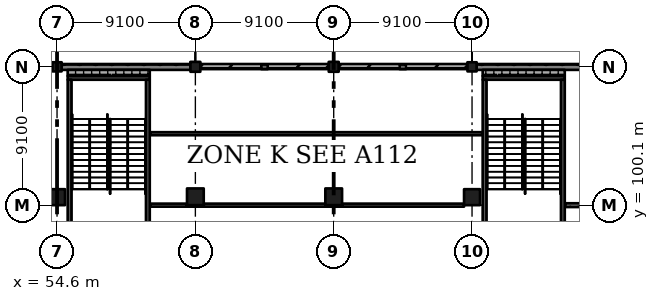
"""IFC4 building model, lengths in metres.
Left out: names, types, materials, properties, quantities, classifications, styles, units other than length and angle.
Written with IfcOpenShell. Run it as: python <this file> out.ifc"""

import sys

from ifc_helpers import new_model, si_unit, direction, frame, frame_2d, origin, origin_2d, place, context, subcontext, project, spatial, rectangle, extrude, element, fill, save


model = new_model("IFC4")
c1 = context("Model", 3, precision=1e-05, world=origin(), true_north=direction((0.0, 1.0)))
c2 = subcontext(c1, "Body", "Model", "MODEL_VIEW")
j1 = project(units=[si_unit("LENGTHUNIT", "METRE"), si_unit("PLANEANGLEUNIT", "RADIAN")], contexts=[c1])
p1 = place(None, origin())
s1 = spatial("IfcSite", under=j1, at=p1, CompositionType="ELEMENT")
p2 = place(p1, origin())
s2 = spatial("IfcBuilding", under=s1, at=p2, CompositionType="ELEMENT")
p3 = place(p2, origin())
s3 = spatial("IfcBuildingStorey", under=s2, at=p3, CompositionType="ELEMENT", Elevation=0.0)
p4 = place(p3, frame((54.6, 100.625, -0.4), z_axis=(0.0, 0.0, 1.0), x_axis=(1.0, 0.0, 0.0)))
e1 = element("IfcColumn", 1, at=p4, inside=s3, PredefinedType="COLUMN", context=c2, shape_type="SweptSolid", body=[
    extrude(rectangle(XDim=1.05, YDim=1.05, at=origin_2d()), origin(), (0.0, 0.0, 1.0), 6.77),
])
p5 = place(p3, frame((54.6, 109.2, -0.4), z_axis=(0.0, 0.0, 1.0), x_axis=(1.0, 0.0, 0.0)))
e2 = element("IfcColumn", 2, at=p5, inside=s3, PredefinedType="COLUMN", context=c2, shape_type="SweptSolid", body=[
    extrude(rectangle(XDim=0.6, YDim=0.6, at=origin_2d()), origin(), (0.0, 0.0, 1.0), 6.77),
])
p6 = place(p3, frame((63.7, 100.65, -0.4), z_axis=(0.0, 0.0, 1.0), x_axis=(1.0, 0.0, 0.0)))
e3 = element("IfcColumn", 3, at=p6, inside=s3, PredefinedType="COLUMN", context=c2, shape_type="SweptSolid", body=[
    extrude(rectangle(XDim=1.1, YDim=1.1, at=origin_2d()), origin(), (0.0, 0.0, 1.0), 6.77),
])
p7 = place(p3, frame((63.7, 109.2, -0.4), z_axis=(0.0, 0.0, 1.0), x_axis=(1.0, 0.0, 0.0)))
e4 = element("IfcColumn", 4, at=p7, inside=s3, PredefinedType="COLUMN", context=c2, shape_type="SweptSolid", body=[
    extrude(rectangle(XDim=0.65, YDim=0.65, at=origin_2d()), origin(), (0.0, 0.0, 1.0), 6.77),
])
p8 = place(p3, frame((72.8, 100.65, -0.4), z_axis=(0.0, 0.0, 1.0), x_axis=(1.0, 0.0, 0.0)))
e5 = element("IfcColumn", 5, at=p8, inside=s3, PredefinedType="COLUMN", context=c2, shape_type="SweptSolid", body=[
    extrude(rectangle(XDim=1.1, YDim=1.1, at=origin_2d()), origin(), (0.0, 0.0, 1.0), 6.77),
])
p9 = place(p3, frame((72.8, 109.2, -0.4), z_axis=(0.0, 0.0, 1.0), x_axis=(1.0, 0.0, 0.0)))
e6 = element("IfcColumn", 6, at=p9, inside=s3, PredefinedType="COLUMN", context=c2, shape_type="SweptSolid", body=[
    extrude(rectangle(XDim=0.65, YDim=0.65, at=origin_2d()), origin(), (0.0, 0.0, 1.0), 6.77),
])
p10 = place(p3, frame((81.9, 100.625, -0.4), z_axis=(0.0, 0.0, 1.0), x_axis=(1.0, 0.0, 0.0)))
e7 = element("IfcColumn", 7, at=p10, inside=s3, PredefinedType="COLUMN", context=c2, shape_type="SweptSolid", body=[
    extrude(rectangle(XDim=1.05, YDim=1.05, at=origin_2d()), origin(), (0.0, 0.0, 1.0), 6.77),
])
p11 = place(p3, frame((81.9, 109.2, -0.4), z_axis=(0.0, 0.0, 1.0), x_axis=(1.0, 0.0, 0.0)))
e8 = element("IfcColumn", 8, at=p11, inside=s3, PredefinedType="COLUMN", context=c2, shape_type="SweptSolid", body=[
    extrude(rectangle(XDim=0.6, YDim=0.6, at=origin_2d()), origin(), (0.0, 0.0, 1.0), 6.77),
])
p12 = place(p3, frame((60.7, 108.475, -0.4), z_axis=(0.0, 0.0, 1.0), x_axis=(-1.0, 0.0, 0.0)))
e9 = element("IfcWall", 9, at=p12, inside=s3, PredefinedType="SHEAR", context=c2, shape_type="SweptSolid", body=[
    extrude(rectangle(XDim=5.4, YDim=0.25, at=frame_2d((2.7, 0.0))), origin(), (0.0, 0.0, 1.0), 6.77),
])
for number, where, z_axis, x_axis in (
    (10, (55.425, 108.35, -0.4), (0.0, 0.0, 1.0), (0.0, -1.0, 0.0)),
    (11, (60.575, 108.35, -0.4), (0.0, 0.0, 1.0), (0.0, -1.0, 0.0)),
):
    element("IfcWall", number, at=place(p3, frame(where, z_axis=z_axis, x_axis=x_axis)), inside=s3, PredefinedType="SHEAR", context=c2, shape_type="SweptSolid", body=[
        extrude(rectangle(XDim=9.6, YDim=0.25, at=frame_2d((4.8, 0.0))), origin(), (0.0, 0.0, 1.0), 6.77),
    ])
p13 = place(p3, frame((88.0, 108.475, -0.4), z_axis=(0.0, 0.0, 1.0), x_axis=(-1.0, 0.0, 0.0)))
e12 = element("IfcWall", 12, at=p13, inside=s3, PredefinedType="SHEAR", context=c2, shape_type="SweptSolid", body=[
    extrude(rectangle(XDim=5.4, YDim=0.25, at=frame_2d((2.7, 0.0))), origin(), (0.0, 0.0, 1.0), 6.77),
])
for number, where, z_axis, x_axis in (
    (13, (82.725, 108.35, -0.4), (0.0, 0.0, 1.0), (0.0, -1.0, 0.0)),
    (14, (87.875, 108.35, -0.4), (0.0, 0.0, 1.0), (0.0, -1.0, 0.0)),
):
    element("IfcWall", number, at=place(p3, frame(where, z_axis=z_axis, x_axis=x_axis)), inside=s3, PredefinedType="SHEAR", context=c2, shape_type="SweptSolid", body=[
        extrude(rectangle(XDim=9.6, YDim=0.25, at=frame_2d((4.8, 0.0))), origin(), (0.0, 0.0, 1.0), 6.77),
    ])
p14 = place(p3, frame((90.675, 109.175, 0.0), z_axis=(0.0, 0.0, 1.0), x_axis=(-1.0, 0.0, 0.0)))
e15 = element("IfcWall", 15, at=p14, inside=s3, PredefinedType="SOLIDWALL", context=c2, shape_type="SweptSolid", body=[
    extrude(rectangle(XDim=8.475, YDim=0.35, at=frame_2d((4.238, 0.0))), origin(), (0.0, 0.0, 1.0), 5.27),
])
p15 = place(p3, frame((81.6, 109.2, 0.0), z_axis=(0.0, 0.0, 1.0), x_axis=(-1.0, 0.0, 0.0)))
e16 = element("IfcWall", 16, at=p15, inside=s3, PredefinedType="SOLIDWALL", context=c2, shape_type="SweptSolid", body=[
    extrude(rectangle(XDim=8.475, YDim=0.3, at=frame_2d((4.238, 0.0))), origin(), (0.0, 0.0, 1.0), 3.75),
])
p16 = place(p15, frame((4.465, 0.0, 0.0)))
e17 = element("IfcOpeningElement", 17, at=p16, cuts=e16, PredefinedType="OPENING", context=c2, shape_type="SweptSolid", body=[
    extrude(rectangle(XDim=3.6, YDim=2.7, at=frame_2d((1.8, 1.35))), frame((0.0, 0.16, 0.0), z_axis=(0.0, -1.0, 0.0), x_axis=(1.0, 0.0, 0.0)), (0.0, 0.0, 1.0), 0.32),
])
p17 = place(p15, frame((0.435, 0.0, 0.0)))
e18 = element("IfcOpeningElement", 18, at=p17, cuts=e16, PredefinedType="OPENING", context=c2, shape_type="SweptSolid", body=[
    extrude(rectangle(XDim=3.6, YDim=2.7, at=frame_2d((1.8, 1.35))), frame((0.0, 0.16, 0.0), z_axis=(0.0, -1.0, 0.0), x_axis=(1.0, 0.0, 0.0)), (0.0, 0.0, 1.0), 0.32),
])
p18 = place(p3, frame((77.565, 109.2, 3.75), z_axis=(0.0, 0.0, 1.0), x_axis=(-1.0, 0.0, 0.0)))
e19 = element("IfcWall", 19, at=p18, inside=s3, PredefinedType="SOLIDWALL", context=c2, shape_type="SweptSolid", body=[
    extrude(rectangle(XDim=0.43, YDim=0.3, at=frame_2d((0.215, 0.0))), origin(), (0.0, 0.0, 1.0), 1.52),
])
p19 = place(p3, frame((72.475, 109.2, 0.0), z_axis=(0.0, 0.0, 1.0), x_axis=(-1.0, 0.0, 0.0)))
e20 = element("IfcWall", 20, at=p19, inside=s3, PredefinedType="SOLIDWALL", context=c2, shape_type="SweptSolid", body=[
    extrude(rectangle(XDim=8.45, YDim=0.3, at=frame_2d((4.225, 0.0))), origin(), (0.0, 0.0, 1.0), 3.75),
])
p20 = place(p19, frame((4.44, 0.0, 0.0)))
e21 = element("IfcOpeningElement", 21, at=p20, cuts=e20, PredefinedType="OPENING", context=c2, shape_type="SweptSolid", body=[
    extrude(rectangle(XDim=3.6, YDim=2.7, at=frame_2d((1.8, 1.35))), frame((0.0, 0.16, 0.0), z_axis=(0.0, -1.0, 0.0), x_axis=(1.0, 0.0, 0.0)), (0.0, 0.0, 1.0), 0.32),
])
p21 = place(p19, frame((0.41, 0.0, 0.0)))
e22 = element("IfcOpeningElement", 22, at=p21, cuts=e20, PredefinedType="OPENING", context=c2, shape_type="SweptSolid", body=[
    extrude(rectangle(XDim=3.6, YDim=2.7, at=frame_2d((1.8, 1.35))), frame((0.0, 0.16, 0.0), z_axis=(0.0, -1.0, 0.0), x_axis=(1.0, 0.0, 0.0)), (0.0, 0.0, 1.0), 0.32),
])
p22 = place(p3, frame((68.465, 109.2, 3.75), z_axis=(0.0, 0.0, 1.0), x_axis=(-1.0, 0.0, 0.0)))
e23 = element("IfcWall", 23, at=p22, inside=s3, PredefinedType="SOLIDWALL", context=c2, shape_type="SweptSolid", body=[
    extrude(rectangle(XDim=0.43, YDim=0.3, at=frame_2d((0.215, 0.0))), origin(), (0.0, 0.0, 1.0), 1.52),
])
p23 = place(p3, frame((63.375, 109.175, 0.0), z_axis=(0.0, 0.0, 1.0), x_axis=(-1.0, 0.0, 0.0)))
e24 = element("IfcWall", 24, at=p23, inside=s3, PredefinedType="SOLIDWALL", context=c2, shape_type="SweptSolid", body=[
    extrude(rectangle(XDim=8.475, YDim=0.35, at=frame_2d((4.238, 0.0))), origin(), (0.0, 0.0, 1.0), 5.27),
])
for number, where, z_axis, x_axis in (
    (25, (55.3, 108.8, 0.0), (0.0, 0.0, 1.0), (1.0, 0.0, 0.0)),
    (26, (82.6, 108.8, 0.0), (0.0, 0.0, 1.0), (1.0, 0.0, 0.0)),
):
    element("IfcWall", number, at=place(p3, frame(where, z_axis=z_axis, x_axis=x_axis)), inside=s3, PredefinedType="SOLIDWALL", context=c2, shape_type="SweptSolid", body=[
        extrude(rectangle(XDim=5.4, YDim=0.4, at=frame_2d((2.7, 0.0))), origin(), (0.0, 0.0, 1.0), 6.02),
    ])
p24 = place(p3, frame((60.73, 100.1, 0.0), z_axis=(0.0, 0.0, 1.0), x_axis=(1.0, 0.0, 0.0)))
e27 = element("IfcWall", 27, at=p24, inside=s3, PredefinedType="PARTITIONING", context=c2, shape_type="SweptSolid", body=[
    extrude(rectangle(XDim=2.42, YDim=0.2, at=frame_2d((1.21, 0.0))), origin(), (0.0, 0.0, 1.0), 5.57),
])
p25 = place(p24, frame((0.55, 0.0, 0.0)))
e28 = element("IfcOpeningElement", 28, at=p25, cuts=e27, PredefinedType="OPENING", context=c2, shape_type="SweptSolid", body=[
    extrude(rectangle(XDim=1.8, YDim=2.4, at=frame_2d((0.9, 1.2))), frame((0.0, 0.11, 0.0), z_axis=(0.0, -1.0, 0.0), x_axis=(1.0, 0.0, 0.0)), (0.0, 0.0, 1.0), 0.22),
])
p26 = place(p3, frame((60.73, 104.8, 0.0), z_axis=(0.0, 0.0, 1.0), x_axis=(1.0, 0.0, 0.0)))
e29 = element("IfcWall", 29, at=p26, inside=s3, PredefinedType="PARTITIONING", context=c2, shape_type="SweptSolid", body=[
    extrude(rectangle(XDim=21.84, YDim=0.2, at=frame_2d((10.92, 0.0))), origin(), (0.0, 0.0, 1.0), 6.02),
])
p27 = place(p26, frame((0.65, 0.0, 0.0)))
e30 = element("IfcOpeningElement", 30, at=p27, cuts=e29, PredefinedType="OPENING", context=c2, shape_type="SweptSolid", body=[
    extrude(rectangle(XDim=1.8, YDim=2.4, at=frame_2d((0.9, 1.2))), frame((0.0, 0.11, 0.0), z_axis=(0.0, -1.0, 0.0), x_axis=(1.0, 0.0, 0.0)), (0.0, 0.0, 1.0), 0.22),
])
p28 = place(p26, frame((3.75, 0.0, 0.0)))
e31 = element("IfcOpeningElement", 31, at=p28, cuts=e29, PredefinedType="OPENING", context=c2, shape_type="SweptSolid", body=[
    extrude(rectangle(XDim=1.8, YDim=2.4, at=frame_2d((0.9, 1.2))), frame((0.0, 0.11, 0.0), z_axis=(0.0, -1.0, 0.0), x_axis=(1.0, 0.0, 0.0)), (0.0, 0.0, 1.0), 0.22),
])
p29 = place(p26, frame((6.95, 0.0, 0.0)))
e32 = element("IfcOpeningElement", 32, at=p29, cuts=e29, PredefinedType="OPENING", context=c2, shape_type="SweptSolid", body=[
    extrude(rectangle(XDim=1.8, YDim=2.4, at=frame_2d((0.9, 1.2))), frame((0.0, 0.11, 0.0), z_axis=(0.0, -1.0, 0.0), x_axis=(1.0, 0.0, 0.0)), (0.0, 0.0, 1.0), 0.22),
])
p30 = place(p26, frame((10.05, 0.0, 0.0)))
e33 = element("IfcOpeningElement", 33, at=p30, cuts=e29, PredefinedType="OPENING", context=c2, shape_type="SweptSolid", body=[
    extrude(rectangle(XDim=1.8, YDim=2.4, at=frame_2d((0.9, 1.2))), frame((0.0, 0.11, 0.0), z_axis=(0.0, -1.0, 0.0), x_axis=(1.0, 0.0, 0.0)), (0.0, 0.0, 1.0), 0.22),
])
p31 = place(p26, frame((13.15, 0.0, 0.0)))
e34 = element("IfcOpeningElement", 34, at=p31, cuts=e29, PredefinedType="OPENING", context=c2, shape_type="SweptSolid", body=[
    extrude(rectangle(XDim=1.8, YDim=2.4, at=frame_2d((0.9, 1.2))), frame((0.0, 0.11, 0.0), z_axis=(0.0, -1.0, 0.0), x_axis=(1.0, 0.0, 0.0)), (0.0, 0.0, 1.0), 0.22),
])
p32 = place(p26, frame((16.25, 0.0, 0.0)))
e35 = element("IfcOpeningElement", 35, at=p32, cuts=e29, PredefinedType="OPENING", context=c2, shape_type="SweptSolid", body=[
    extrude(rectangle(XDim=1.8, YDim=2.4, at=frame_2d((0.9, 1.2))), frame((0.0, 0.11, 0.0), z_axis=(0.0, -1.0, 0.0), x_axis=(1.0, 0.0, 0.0)), (0.0, 0.0, 1.0), 0.22),
])
p33 = place(p26, frame((19.35, 0.0, 0.0)))
e36 = element("IfcOpeningElement", 36, at=p33, cuts=e29, PredefinedType="OPENING", context=c2, shape_type="SweptSolid", body=[
    extrude(rectangle(XDim=1.8, YDim=2.4, at=frame_2d((0.9, 1.2))), frame((0.0, 0.11, 0.0), z_axis=(0.0, -1.0, 0.0), x_axis=(1.0, 0.0, 0.0)), (0.0, 0.0, 1.0), 0.22),
])
p34 = place(p3, frame((88.03, 100.1, 0.0), z_axis=(0.0, 0.0, 1.0), x_axis=(1.0, 0.0, 0.0)))
e37 = element("IfcWall", 37, at=p34, inside=s3, PredefinedType="SOLIDWALL", context=c2, shape_type="SweptSolid", body=[
    extrude(rectangle(XDim=2.42, YDim=0.25, at=frame_2d((1.21, 0.0))), origin(), (0.0, 0.0, 1.0), 5.57),
])
p35 = place(p3, frame((63.15, 100.1, 0.0), z_axis=(0.0, 0.0, 1.0), x_axis=(1.0, 0.0, 0.0)))
e38 = element("IfcWall", 38, at=p35, inside=s3, PredefinedType="PARTITIONING", context=c2, shape_type="SweptSolid", body=[
    extrude(rectangle(XDim=1.1, YDim=0.2, at=frame_2d((0.55, 0.0))), origin(), (0.0, 0.0, 1.0), 6.02),
])
p36 = place(p3, frame((64.25, 100.1, 0.0), z_axis=(0.0, 0.0, 1.0), x_axis=(1.0, 0.0, 0.0)))
e39 = element("IfcWall", 39, at=p36, inside=s3, PredefinedType="PARTITIONING", context=c2, shape_type="SweptSolid", body=[
    extrude(rectangle(XDim=8.0, YDim=0.2, at=frame_2d((4.0, 0.0))), origin(), (0.0, 0.0, 1.0), 5.32),
])
p37 = place(p36, frame((0.73, 0.0, 0.0)))
e40 = element("IfcOpeningElement", 40, at=p37, cuts=e39, PredefinedType="OPENING", context=c2, shape_type="SweptSolid", body=[
    extrude(rectangle(XDim=1.8, YDim=2.4, at=frame_2d((0.9, 1.2))), frame((0.0, 0.11, 0.0), z_axis=(0.0, -1.0, 0.0), x_axis=(1.0, 0.0, 0.0)), (0.0, 0.0, 1.0), 0.22),
])
p38 = place(p36, frame((4.23, 0.0, 0.0)))
e41 = element("IfcOpeningElement", 41, at=p38, cuts=e39, PredefinedType="OPENING", context=c2, shape_type="SweptSolid", body=[
    extrude(rectangle(XDim=1.8, YDim=2.4, at=frame_2d((0.9, 1.2))), frame((0.0, 0.11, 0.0), z_axis=(0.0, -1.0, 0.0), x_axis=(1.0, 0.0, 0.0)), (0.0, 0.0, 1.0), 0.22),
])
p39 = place(p36, frame((6.13, 0.0, 0.0)))
e42 = element("IfcOpeningElement", 42, at=p39, cuts=e39, PredefinedType="OPENING", context=c2, shape_type="SweptSolid", body=[
    extrude(rectangle(XDim=1.8, YDim=2.4, at=frame_2d((0.9, 1.2))), frame((0.0, 0.11, 0.0), z_axis=(0.0, -1.0, 0.0), x_axis=(1.0, 0.0, 0.0)), (0.0, 0.0, 1.0), 0.22),
])
p40 = place(p3, frame((72.25, 100.1, 0.0), z_axis=(0.0, 0.0, 1.0), x_axis=(1.0, 0.0, 0.0)))
e43 = element("IfcWall", 43, at=p40, inside=s3, PredefinedType="PARTITIONING", context=c2, shape_type="SweptSolid", body=[
    extrude(rectangle(XDim=1.1, YDim=0.2, at=frame_2d((0.55, 0.0))), origin(), (0.0, 0.0, 1.0), 6.02),
])
p41 = place(p3, frame((73.35, 100.1, 0.0), z_axis=(0.0, 0.0, 1.0), x_axis=(1.0, 0.0, 0.0)))
e44 = element("IfcWall", 44, at=p41, inside=s3, PredefinedType="PARTITIONING", context=c2, shape_type="SweptSolid", body=[
    extrude(rectangle(XDim=8.025, YDim=0.2, at=frame_2d((4.012, 0.0))), origin(), (0.0, 0.0, 1.0), 5.32),
])
p42 = place(p41, frame((1.93, 0.0, 0.0)))
e45 = element("IfcOpeningElement", 45, at=p42, cuts=e44, PredefinedType="OPENING", context=c2, shape_type="SweptSolid", body=[
    extrude(rectangle(XDim=1.8, YDim=2.4, at=frame_2d((0.9, 1.2))), frame((0.0, 0.11, 0.0), z_axis=(0.0, -1.0, 0.0), x_axis=(1.0, 0.0, 0.0)), (0.0, 0.0, 1.0), 0.22),
])
p43 = place(p41, frame((5.43, 0.0, 0.0)))
e46 = element("IfcOpeningElement", 46, at=p43, cuts=e44, PredefinedType="OPENING", context=c2, shape_type="SweptSolid", body=[
    extrude(rectangle(XDim=1.8, YDim=2.4, at=frame_2d((0.9, 1.2))), frame((0.0, 0.11, 0.0), z_axis=(0.0, -1.0, 0.0), x_axis=(1.0, 0.0, 0.0)), (0.0, 0.0, 1.0), 0.22),
])
p44 = place(p16, frame((3.6, 0.0, 0.0), z_axis=(0.0, 0.0, 1.0), x_axis=(-1.0, 0.0, 0.0)))
e47 = element("IfcDoor", 47, at=p44, inside=s3, OperationType="DOUBLE_DOOR_SINGLE_SWING", PredefinedType="DOOR", context=c2, shape_type="SweptSolid", body=[
    extrude(rectangle(XDim=3.6, YDim=2.7, at=frame_2d((1.8, 1.35))), frame((0.0, 0.025, 0.0), z_axis=(0.0, -1.0, 0.0), x_axis=(1.0, 0.0, 0.0)), (0.0, 0.0, 1.0), 0.05),
])
fill(e17, e47)
p45 = place(p17, frame((3.6, 0.0, 0.0), z_axis=(0.0, 0.0, 1.0), x_axis=(-1.0, 0.0, 0.0)))
e48 = element("IfcDoor", 48, at=p45, inside=s3, OperationType="DOUBLE_DOOR_SINGLE_SWING", PredefinedType="DOOR", context=c2, shape_type="SweptSolid", body=[
    extrude(rectangle(XDim=3.6, YDim=2.7, at=frame_2d((1.8, 1.35))), frame((0.0, 0.025, 0.0), z_axis=(0.0, -1.0, 0.0), x_axis=(1.0, 0.0, 0.0)), (0.0, 0.0, 1.0), 0.05),
])
fill(e18, e48)
p46 = place(p20, frame((3.6, 0.0, 0.0), z_axis=(0.0, 0.0, 1.0), x_axis=(-1.0, 0.0, 0.0)))
e49 = element("IfcDoor", 49, at=p46, inside=s3, OperationType="DOUBLE_DOOR_SINGLE_SWING", PredefinedType="DOOR", context=c2, shape_type="SweptSolid", body=[
    extrude(rectangle(XDim=3.6, YDim=2.7, at=frame_2d((1.8, 1.35))), frame((0.0, 0.025, 0.0), z_axis=(0.0, -1.0, 0.0), x_axis=(1.0, 0.0, 0.0)), (0.0, 0.0, 1.0), 0.05),
])
fill(e21, e49)
p47 = place(p21, frame((3.6, 0.0, 0.0), z_axis=(0.0, 0.0, 1.0), x_axis=(-1.0, 0.0, 0.0)))
e50 = element("IfcDoor", 50, at=p47, inside=s3, OperationType="DOUBLE_DOOR_SINGLE_SWING", PredefinedType="DOOR", context=c2, shape_type="SweptSolid", body=[
    extrude(rectangle(XDim=3.6, YDim=2.7, at=frame_2d((1.8, 1.35))), frame((0.0, 0.025, 0.0), z_axis=(0.0, -1.0, 0.0), x_axis=(1.0, 0.0, 0.0)), (0.0, 0.0, 1.0), 0.05),
])
fill(e22, e50)
p48 = place(p25, origin())
e51 = element("IfcDoor", 51, at=p48, inside=s3, OperationType="DOUBLE_DOOR_SINGLE_SWING", PredefinedType="DOOR", context=c2, shape_type="SweptSolid", body=[
    extrude(rectangle(XDim=1.8, YDim=2.4, at=frame_2d((0.9, 1.2))), frame((0.0, 0.025, 0.0), z_axis=(0.0, -1.0, 0.0), x_axis=(1.0, 0.0, 0.0)), (0.0, 0.0, 1.0), 0.05),
])
fill(e28, e51)
p49 = place(p37, origin())
e52 = element("IfcDoor", 52, at=p49, inside=s3, OperationType="DOUBLE_DOOR_SINGLE_SWING", PredefinedType="DOOR", context=c2, shape_type="SweptSolid", body=[
    extrude(rectangle(XDim=1.8, YDim=2.4, at=frame_2d((0.9, 1.2))), frame((0.0, 0.025, 0.0), z_axis=(0.0, -1.0, 0.0), x_axis=(1.0, 0.0, 0.0)), (0.0, 0.0, 1.0), 0.05),
])
fill(e40, e52)
p50 = place(p38, origin())
e53 = element("IfcDoor", 53, at=p50, inside=s3, OperationType="DOUBLE_DOOR_SINGLE_SWING", PredefinedType="DOOR", context=c2, shape_type="SweptSolid", body=[
    extrude(rectangle(XDim=1.8, YDim=2.4, at=frame_2d((0.9, 1.2))), frame((0.0, 0.025, 0.0), z_axis=(0.0, -1.0, 0.0), x_axis=(1.0, 0.0, 0.0)), (0.0, 0.0, 1.0), 0.05),
])
fill(e41, e53)
p51 = place(p39, origin())
e54 = element("IfcDoor", 54, at=p51, inside=s3, OperationType="DOUBLE_DOOR_SINGLE_SWING", PredefinedType="DOOR", context=c2, shape_type="SweptSolid", body=[
    extrude(rectangle(XDim=1.8, YDim=2.4, at=frame_2d((0.9, 1.2))), frame((0.0, 0.025, 0.0), z_axis=(0.0, -1.0, 0.0), x_axis=(1.0, 0.0, 0.0)), (0.0, 0.0, 1.0), 0.05),
])
fill(e42, e54)
p52 = place(p42, origin())
e55 = element("IfcDoor", 55, at=p52, inside=s3, OperationType="DOUBLE_DOOR_SINGLE_SWING", PredefinedType="DOOR", context=c2, shape_type="SweptSolid", body=[
    extrude(rectangle(XDim=1.8, YDim=2.4, at=frame_2d((0.9, 1.2))), frame((0.0, 0.025, 0.0), z_axis=(0.0, -1.0, 0.0), x_axis=(1.0, 0.0, 0.0)), (0.0, 0.0, 1.0), 0.05),
])
fill(e45, e55)
p53 = place(p43, origin())
e56 = element("IfcDoor", 56, at=p53, inside=s3, OperationType="DOUBLE_DOOR_SINGLE_SWING", PredefinedType="DOOR", context=c2, shape_type="SweptSolid", body=[
    extrude(rectangle(XDim=1.8, YDim=2.4, at=frame_2d((0.9, 1.2))), frame((0.0, 0.025, 0.0), z_axis=(0.0, -1.0, 0.0), x_axis=(1.0, 0.0, 0.0)), (0.0, 0.0, 1.0), 0.05),
])
fill(e46, e56)
p54 = place(p27, origin())
e57 = element("IfcDoor", 57, at=p54, inside=s3, OperationType="DOUBLE_DOOR_SINGLE_SWING", PredefinedType="DOOR", context=c2, shape_type="SweptSolid", body=[
    extrude(rectangle(XDim=1.8, YDim=2.4, at=frame_2d((0.9, 1.2))), frame((0.0, 0.025, 0.0), z_axis=(0.0, -1.0, 0.0), x_axis=(1.0, 0.0, 0.0)), (0.0, 0.0, 1.0), 0.05),
])
fill(e30, e57)
p55 = place(p28, origin())
e58 = element("IfcDoor", 58, at=p55, inside=s3, OperationType="DOUBLE_DOOR_SINGLE_SWING", PredefinedType="DOOR", context=c2, shape_type="SweptSolid", body=[
    extrude(rectangle(XDim=1.8, YDim=2.4, at=frame_2d((0.9, 1.2))), frame((0.0, 0.025, 0.0), z_axis=(0.0, -1.0, 0.0), x_axis=(1.0, 0.0, 0.0)), (0.0, 0.0, 1.0), 0.05),
])
fill(e31, e58)
p56 = place(p29, origin())
e59 = element("IfcDoor", 59, at=p56, inside=s3, OperationType="DOUBLE_DOOR_SINGLE_SWING", PredefinedType="DOOR", context=c2, shape_type="SweptSolid", body=[
    extrude(rectangle(XDim=1.8, YDim=2.4, at=frame_2d((0.9, 1.2))), frame((0.0, 0.025, 0.0), z_axis=(0.0, -1.0, 0.0), x_axis=(1.0, 0.0, 0.0)), (0.0, 0.0, 1.0), 0.05),
])
fill(e32, e59)
p57 = place(p30, origin())
e60 = element("IfcDoor", 60, at=p57, inside=s3, OperationType="DOUBLE_DOOR_SINGLE_SWING", PredefinedType="DOOR", context=c2, shape_type="SweptSolid", body=[
    extrude(rectangle(XDim=1.8, YDim=2.4, at=frame_2d((0.9, 1.2))), frame((0.0, 0.025, 0.0), z_axis=(0.0, -1.0, 0.0), x_axis=(1.0, 0.0, 0.0)), (0.0, 0.0, 1.0), 0.05),
])
fill(e33, e60)
p58 = place(p31, origin())
e61 = element("IfcDoor", 61, at=p58, inside=s3, OperationType="DOUBLE_DOOR_SINGLE_SWING", PredefinedType="DOOR", context=c2, shape_type="SweptSolid", body=[
    extrude(rectangle(XDim=1.8, YDim=2.4, at=frame_2d((0.9, 1.2))), frame((0.0, 0.025, 0.0), z_axis=(0.0, -1.0, 0.0), x_axis=(1.0, 0.0, 0.0)), (0.0, 0.0, 1.0), 0.05),
])
fill(e34, e61)
p59 = place(p32, origin())
e62 = element("IfcDoor", 62, at=p59, inside=s3, OperationType="DOUBLE_DOOR_SINGLE_SWING", PredefinedType="DOOR", context=c2, shape_type="SweptSolid", body=[
    extrude(rectangle(XDim=1.8, YDim=2.4, at=frame_2d((0.9, 1.2))), frame((0.0, 0.025, 0.0), z_axis=(0.0, -1.0, 0.0), x_axis=(1.0, 0.0, 0.0)), (0.0, 0.0, 1.0), 0.05),
])
fill(e35, e62)
p60 = place(p33, origin())
e63 = element("IfcDoor", 63, at=p60, inside=s3, OperationType="DOUBLE_DOOR_SINGLE_SWING", PredefinedType="DOOR", context=c2, shape_type="SweptSolid", body=[
    extrude(rectangle(XDim=1.8, YDim=2.4, at=frame_2d((0.9, 1.2))), frame((0.0, 0.025, 0.0), z_axis=(0.0, -1.0, 0.0), x_axis=(1.0, 0.0, 0.0)), (0.0, 0.0, 1.0), 0.05),
])
fill(e36, e63)
save(model, sys.argv[1])
